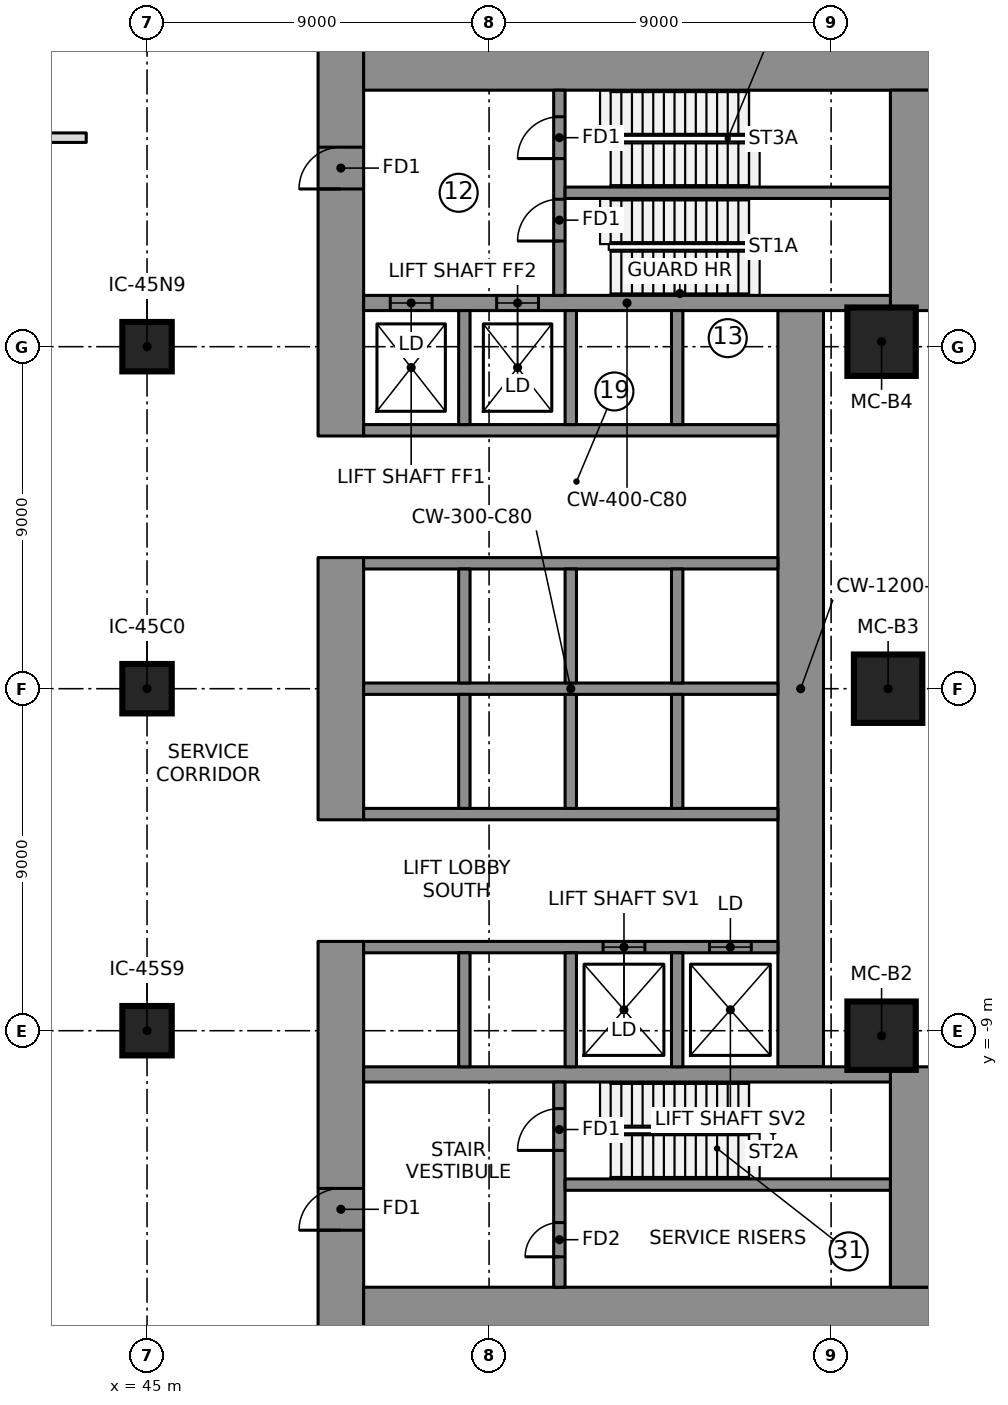
"""IFC4 building model, lengths in metres.
Left out: names, types, materials, properties, quantities, classifications, styles, units other than length and angle.
Written with IfcOpenShell. Run it as: python <this file> out.ifc"""

import sys

from ifc_helpers import new_model, si_unit, direction, frame, frame_2d, origin, origin_2d, place, context, subcontext, project, spatial, rectangle, extrude, element, fill, save


model = new_model("IFC4")
c1 = context("Model", 3, precision=1e-05, world=origin(), true_north=direction((0.0, 1.0)))
c2 = subcontext(c1, "Body", "Model", "MODEL_VIEW")
j1 = project(units=[si_unit("LENGTHUNIT", "METRE"), si_unit("PLANEANGLEUNIT", "RADIAN")], contexts=[c1])
p1 = place(None, origin())
s1 = spatial("IfcSite", under=j1, at=p1, CompositionType="ELEMENT")
p2 = place(p1, origin())
s2 = spatial("IfcBuilding", under=s1, at=p2, CompositionType="ELEMENT")
p3 = place(p2, frame((0.0, 0.0, -10.0)))
s3 = spatial("IfcBuildingStorey", under=s2, at=p3, CompositionType="ELEMENT", Elevation=-10.0)
p4 = place(p3, frame((50.1, 6.65, -0.3), z_axis=(0.0, 0.0, 1.0), x_axis=(0.0, 1.0, 0.0)))
e1 = element("IfcWall", 1, at=p4, inside=s3, PredefinedType="SHEAR", context=c2, shape_type="SweptSolid", body=[
    extrude(rectangle(XDim=10.3, YDim=1.2, at=frame_2d((5.15, 0.0))), origin(), (0.0, 0.0, 1.0), 5.3),
])
p5 = place(p4, frame((6.5, 0.0, 0.3)))
e2 = element("IfcOpeningElement", 2, at=p5, cuts=e1, PredefinedType="OPENING", context=c2, shape_type="SweptSolid", body=[
    extrude(rectangle(XDim=1.1, YDim=2.1, at=frame_2d((0.55, 1.05))), frame((0.0, 0.61, 0.0), z_axis=(0.0, -1.0, 0.0), x_axis=(1.0, 0.0, 0.0)), (0.0, 0.0, 1.0), 1.22),
])
p6 = place(p3, frame((50.1, -3.45, -0.3), z_axis=(0.0, 0.0, 1.0), x_axis=(0.0, 1.0, 0.0)))
e3 = element("IfcWall", 3, at=p6, inside=s3, PredefinedType="SHEAR", context=c2, shape_type="SweptSolid", body=[
    extrude(rectangle(XDim=6.9, YDim=1.2, at=frame_2d((3.45, 0.0))), origin(), (0.0, 0.0, 1.0), 5.3),
])
p7 = place(p3, frame((50.1, -16.95, -0.3), z_axis=(0.0, 0.0, 1.0), x_axis=(0.0, 1.0, 0.0)))
e4 = element("IfcWall", 4, at=p7, inside=s3, PredefinedType="SHEAR", context=c2, shape_type="SweptSolid", body=[
    extrude(rectangle(XDim=10.3, YDim=1.2, at=frame_2d((5.15, 0.0))), origin(), (0.0, 0.0, 1.0), 5.3),
])
p8 = place(p7, frame((2.7, 0.0, 0.3)))
e5 = element("IfcOpeningElement", 5, at=p8, cuts=e4, PredefinedType="OPENING", context=c2, shape_type="SweptSolid", body=[
    extrude(rectangle(XDim=1.1, YDim=2.1, at=frame_2d((0.55, 1.05))), frame((0.0, 0.61, 0.0), z_axis=(0.0, -1.0, 0.0), x_axis=(1.0, 0.0, 0.0)), (0.0, 0.0, 1.0), 1.22),
])
for number, where, z_axis, x_axis in (
    (6, (50.7, 16.35, -0.3), (0.0, 0.0, 1.0), (1.0, 0.0, 0.0)),
    (7, (50.7, -16.35, -0.3), (0.0, 0.0, 1.0), (1.0, 0.0, 0.0)),
):
    element("IfcWall", number, at=place(p3, frame(where, z_axis=z_axis, x_axis=x_axis)), inside=s3, PredefinedType="SHEAR", context=c2, shape_type="SweptSolid", body=[
        extrude(rectangle(XDim=15.06, YDim=1.2, at=frame_2d((7.53, 0.0))), origin(), (0.0, 0.0, 1.0), 5.3),
    ])
for number, where, z_axis, x_axis in (
    (8, (65.16, 9.95, -0.3), (0.0, 0.0, 1.0), (0.0, 1.0, 0.0)),
    (9, (65.16, -15.75, -0.3), (0.0, 0.0, 1.0), (0.0, 1.0, 0.0)),
):
    element("IfcWall", number, at=place(p3, frame(where, z_axis=z_axis, x_axis=x_axis)), inside=s3, PredefinedType="SHEAR", context=c2, shape_type="SweptSolid", body=[
        extrude(rectangle(XDim=5.8, YDim=1.2, at=frame_2d((2.9, 0.0))), origin(), (0.0, 0.0, 1.0), 5.3),
    ])
p9 = place(p3, frame((62.2, -9.95, -0.3), z_axis=(0.0, 0.0, 1.0), x_axis=(0.0, 1.0, 0.0)))
e10 = element("IfcWall", 10, at=p9, inside=s3, PredefinedType="SHEAR", context=c2, shape_type="SweptSolid", body=[
    extrude(rectangle(XDim=19.9, YDim=1.2, at=frame_2d((9.95, 0.0))), origin(), (0.0, 0.0, 1.0), 5.3),
])
p10 = place(p3, frame((50.7, 10.15, -0.3), z_axis=(0.0, 0.0, 1.0), x_axis=(1.0, 0.0, 0.0)))
e11 = element("IfcWall", 11, at=p10, inside=s3, PredefinedType="SHEAR", context=c2, shape_type="SweptSolid", body=[
    extrude(rectangle(XDim=13.86, YDim=0.4, at=frame_2d((6.93, 0.0))), origin(), (0.0, 0.0, 1.0), 5.3),
])
p11 = place(p10, frame((0.7, 0.0, 0.3)))
e12 = element("IfcOpeningElement", 12, at=p11, cuts=e11, PredefinedType="OPENING", context=c2, shape_type="SweptSolid", body=[
    extrude(rectangle(XDim=1.1, YDim=2.1, at=frame_2d((0.55, 1.05))), frame((0.0, 0.21, 0.0), z_axis=(0.0, -1.0, 0.0), x_axis=(1.0, 0.0, 0.0)), (0.0, 0.0, 1.0), 0.42),
])
p12 = place(p10, frame((3.5, 0.0, 0.3)))
e13 = element("IfcOpeningElement", 13, at=p12, cuts=e11, PredefinedType="OPENING", context=c2, shape_type="SweptSolid", body=[
    extrude(rectangle(XDim=1.1, YDim=2.1, at=frame_2d((0.55, 1.05))), frame((0.0, 0.21, 0.0), z_axis=(0.0, -1.0, 0.0), x_axis=(1.0, 0.0, 0.0)), (0.0, 0.0, 1.0), 0.42),
])
p13 = place(p3, frame((50.7, -10.15, -0.3), z_axis=(0.0, 0.0, 1.0), x_axis=(1.0, 0.0, 0.0)))
e14 = element("IfcWall", 14, at=p13, inside=s3, PredefinedType="SHEAR", context=c2, shape_type="SweptSolid", body=[
    extrude(rectangle(XDim=13.86, YDim=0.4, at=frame_2d((6.93, 0.0))), origin(), (0.0, 0.0, 1.0), 5.3),
])
for number, where, z_axis, x_axis in (
    (15, (50.7, 0.0, -0.3), (0.0, 0.0, 1.0), (1.0, 0.0, 0.0)),
    (16, (50.7, 3.3, -0.3), (0.0, 0.0, 1.0), (1.0, 0.0, 0.0)),
    (17, (50.7, 6.8, -0.3), (0.0, 0.0, 1.0), (1.0, 0.0, 0.0)),
):
    element("IfcWall", number, at=place(p3, frame(where, z_axis=z_axis, x_axis=x_axis)), inside=s3, PredefinedType="SHEAR", context=c2, shape_type="SweptSolid", body=[
        extrude(rectangle(XDim=10.9, YDim=0.3, at=frame_2d((5.45, 0.0))), origin(), (0.0, 0.0, 1.0), 5.3),
    ])
for number, where, z_axis, x_axis in (
    (18, (53.35, 0.15, -0.3), (0.0, 0.0, 1.0), (0.0, 1.0, 0.0)),
    (19, (53.35, 6.95, -0.3), (0.0, 0.0, 1.0), (0.0, 1.0, 0.0)),
    (20, (56.15, 0.15, -0.3), (0.0, 0.0, 1.0), (0.0, 1.0, 0.0)),
    (21, (56.15, 6.95, -0.3), (0.0, 0.0, 1.0), (0.0, 1.0, 0.0)),
    (22, (58.95, 0.15, -0.3), (0.0, 0.0, 1.0), (0.0, 1.0, 0.0)),
    (23, (58.95, 6.95, -0.3), (0.0, 0.0, 1.0), (0.0, 1.0, 0.0)),
):
    element("IfcWall", number, at=place(p3, frame(where, z_axis=z_axis, x_axis=x_axis)), inside=s3, PredefinedType="SHEAR", context=c2, shape_type="SweptSolid", body=[
        extrude(rectangle(XDim=3.0, YDim=0.3, at=frame_2d((1.5, 0.0))), origin(), (0.0, 0.0, 1.0), 5.3),
    ])
p14 = place(p3, frame((50.7, -3.3, -0.3), z_axis=(0.0, 0.0, 1.0), x_axis=(1.0, 0.0, 0.0)))
e24 = element("IfcWall", 24, at=p14, inside=s3, PredefinedType="SHEAR", context=c2, shape_type="SweptSolid", body=[
    extrude(rectangle(XDim=10.9, YDim=0.3, at=frame_2d((5.45, 0.0))), origin(), (0.0, 0.0, 1.0), 5.3),
])
p15 = place(p3, frame((50.7, -6.8, -0.3), z_axis=(0.0, 0.0, 1.0), x_axis=(1.0, 0.0, 0.0)))
e25 = element("IfcWall", 25, at=p15, inside=s3, PredefinedType="SHEAR", context=c2, shape_type="SweptSolid", body=[
    extrude(rectangle(XDim=10.9, YDim=0.3, at=frame_2d((5.45, 0.0))), origin(), (0.0, 0.0, 1.0), 5.3),
])
p16 = place(p15, frame((6.3, 0.0, 0.3)))
e26 = element("IfcOpeningElement", 26, at=p16, cuts=e25, PredefinedType="OPENING", context=c2, shape_type="SweptSolid", body=[
    extrude(rectangle(XDim=1.1, YDim=2.1, at=frame_2d((0.55, 1.05))), frame((0.0, 0.16, 0.0), z_axis=(0.0, -1.0, 0.0), x_axis=(1.0, 0.0, 0.0)), (0.0, 0.0, 1.0), 0.32),
])
p17 = place(p15, frame((9.1, 0.0, 0.3)))
e27 = element("IfcOpeningElement", 27, at=p17, cuts=e25, PredefinedType="OPENING", context=c2, shape_type="SweptSolid", body=[
    extrude(rectangle(XDim=1.1, YDim=2.1, at=frame_2d((0.55, 1.05))), frame((0.0, 0.16, 0.0), z_axis=(0.0, -1.0, 0.0), x_axis=(1.0, 0.0, 0.0)), (0.0, 0.0, 1.0), 0.32),
])
for number, where, z_axis, x_axis in (
    (28, (53.35, -3.15, -0.3), (0.0, 0.0, 1.0), (0.0, 1.0, 0.0)),
    (29, (53.35, -9.95, -0.3), (0.0, 0.0, 1.0), (0.0, 1.0, 0.0)),
    (30, (56.15, -3.15, -0.3), (0.0, 0.0, 1.0), (0.0, 1.0, 0.0)),
    (31, (56.15, -9.95, -0.3), (0.0, 0.0, 1.0), (0.0, 1.0, 0.0)),
    (32, (58.95, -3.15, -0.3), (0.0, 0.0, 1.0), (0.0, 1.0, 0.0)),
    (33, (58.95, -9.95, -0.3), (0.0, 0.0, 1.0), (0.0, 1.0, 0.0)),
):
    element("IfcWall", number, at=place(p3, frame(where, z_axis=z_axis, x_axis=x_axis)), inside=s3, PredefinedType="SHEAR", context=c2, shape_type="SweptSolid", body=[
        extrude(rectangle(XDim=3.0, YDim=0.3, at=frame_2d((1.5, 0.0))), origin(), (0.0, 0.0, 1.0), 5.3),
    ])
p18 = place(p3, frame((55.85, 10.35, -0.3), z_axis=(0.0, 0.0, 1.0), x_axis=(0.0, 1.0, 0.0)))
e34 = element("IfcWall", 34, at=p18, inside=s3, PredefinedType="SHEAR", context=c2, shape_type="SweptSolid", body=[
    extrude(rectangle(XDim=5.4, YDim=0.3, at=frame_2d((2.7, 0.0))), origin(), (0.0, 0.0, 1.0), 5.3),
])
p19 = place(p18, frame((1.43, 0.0, 0.3)))
e35 = element("IfcOpeningElement", 35, at=p19, cuts=e34, PredefinedType="OPENING", context=c2, shape_type="SweptSolid", body=[
    extrude(rectangle(XDim=1.1, YDim=2.1, at=frame_2d((0.55, 1.05))), frame((0.0, 0.16, 0.0), z_axis=(0.0, -1.0, 0.0), x_axis=(1.0, 0.0, 0.0)), (0.0, 0.0, 1.0), 0.32),
])
p20 = place(p18, frame((3.6, 0.0, 0.3)))
e36 = element("IfcOpeningElement", 36, at=p20, cuts=e34, PredefinedType="OPENING", context=c2, shape_type="SweptSolid", body=[
    extrude(rectangle(XDim=1.1, YDim=2.1, at=frame_2d((0.55, 1.05))), frame((0.0, 0.16, 0.0), z_axis=(0.0, -1.0, 0.0), x_axis=(1.0, 0.0, 0.0)), (0.0, 0.0, 1.0), 0.32),
])
p21 = place(p3, frame((55.85, -15.75, -0.3), z_axis=(0.0, 0.0, 1.0), x_axis=(0.0, 1.0, 0.0)))
e37 = element("IfcWall", 37, at=p21, inside=s3, PredefinedType="SHEAR", context=c2, shape_type="SweptSolid", body=[
    extrude(rectangle(XDim=5.4, YDim=0.3, at=frame_2d((2.7, 0.0))), origin(), (0.0, 0.0, 1.0), 5.3),
])
p22 = place(p21, frame((3.6, 0.0, 0.3)))
e38 = element("IfcOpeningElement", 38, at=p22, cuts=e37, PredefinedType="OPENING", context=c2, shape_type="SweptSolid", body=[
    extrude(rectangle(XDim=1.1, YDim=2.1, at=frame_2d((0.55, 1.05))), frame((0.0, 0.16, 0.0), z_axis=(0.0, -1.0, 0.0), x_axis=(1.0, 0.0, 0.0)), (0.0, 0.0, 1.0), 0.32),
])
p23 = place(p21, frame((0.8, 0.0, 0.3)))
e39 = element("IfcOpeningElement", 39, at=p23, cuts=e37, PredefinedType="OPENING", context=c2, shape_type="SweptSolid", body=[
    extrude(rectangle(XDim=0.9, YDim=2.1, at=frame_2d((0.45, 1.05))), frame((0.0, 0.16, 0.0), z_axis=(0.0, -1.0, 0.0), x_axis=(1.0, 0.0, 0.0)), (0.0, 0.0, 1.0), 0.32),
])
for number, where, z_axis, x_axis in (
    (40, (56.0, 13.05, -0.3), (0.0, 0.0, 1.0), (1.0, 0.0, 0.0)),
    (41, (56.0, -13.05, -0.3), (0.0, 0.0, 1.0), (1.0, 0.0, 0.0)),
):
    element("IfcWall", number, at=place(p3, frame(where, z_axis=z_axis, x_axis=x_axis)), inside=s3, PredefinedType="SHEAR", context=c2, shape_type="SweptSolid", body=[
        extrude(rectangle(XDim=8.56, YDim=0.3, at=frame_2d((4.28, 0.0))), origin(), (0.0, 0.0, 1.0), 5.3),
    ])
for number, where, z_axis, x_axis in (
    (42, (64.328, -9.131, -0.3), (0.0, 0.0, 1.0), (1.0, 0.0, 0.0)),
    (43, (64.5, 0.0, -0.3), (0.0, 0.0, 1.0), (1.0, 0.0, 0.0)),
    (44, (64.328, 9.131, -0.3), (0.0, 0.0, 1.0), (1.0, 0.0, 0.0)),
):
    element("IfcColumn", number, at=place(p3, frame(where, z_axis=z_axis, x_axis=x_axis)), inside=s3, PredefinedType="COLUMN", context=c2, shape_type="SweptSolid", body=[
        extrude(rectangle(XDim=1.8, YDim=1.8, at=origin_2d()), origin(), (0.0, 0.0, 1.0), 5.3),
    ])
for number, where, z_axis, x_axis in (
    (45, (45.0, -9.0, -0.3), (0.0, 0.0, 1.0), (1.0, 0.0, 0.0)),
    (46, (45.0, 0.0, -0.3), (0.0, 0.0, 1.0), (1.0, 0.0, 0.0)),
    (47, (45.0, 9.0, -0.3), (0.0, 0.0, 1.0), (1.0, 0.0, 0.0)),
):
    element("IfcColumn", number, at=place(p3, frame(where, z_axis=z_axis, x_axis=x_axis)), inside=s3, PredefinedType="COLUMN", context=c2, shape_type="SweptSolid", body=[
        extrude(rectangle(XDim=1.3, YDim=1.3, at=origin_2d()), origin(), (0.0, 0.0, 1.0), 5.3),
    ])
p24 = place(p3, frame((39.125, 14.5, 0.0), z_axis=(0.0, 0.0, 1.0), x_axis=(1.0, 0.0, 0.0)))
e48 = element("IfcWall", 48, at=p24, inside=s3, PredefinedType="PARTITIONING", context=c2, shape_type="SweptSolid", body=[
    extrude(rectangle(XDim=4.275, YDim=0.25, at=frame_2d((2.137, 0.0))), origin(), (0.0, 0.0, 1.0), 4.7),
])
p25 = place(p11, origin())
e49 = element("IfcDoor", 49, at=p25, inside=s3, OperationType="DOUBLE_DOOR_SLIDING", PredefinedType="DOOR", context=c2, shape_type="SweptSolid", body=[
    extrude(rectangle(XDim=1.1, YDim=2.1, at=frame_2d((0.55, 1.05))), frame((0.0, 0.025, 0.0), z_axis=(0.0, -1.0, 0.0), x_axis=(1.0, 0.0, 0.0)), (0.0, 0.0, 1.0), 0.05),
])
fill(e12, e49)
p26 = place(p12, origin())
e50 = element("IfcDoor", 50, at=p26, inside=s3, OperationType="DOUBLE_DOOR_SLIDING", PredefinedType="DOOR", context=c2, shape_type="SweptSolid", body=[
    extrude(rectangle(XDim=1.1, YDim=2.1, at=frame_2d((0.55, 1.05))), frame((0.0, 0.025, 0.0), z_axis=(0.0, -1.0, 0.0), x_axis=(1.0, 0.0, 0.0)), (0.0, 0.0, 1.0), 0.05),
])
fill(e13, e50)
p27 = place(p16, origin())
e51 = element("IfcDoor", 51, at=p27, inside=s3, OperationType="DOUBLE_DOOR_SLIDING", PredefinedType="DOOR", context=c2, shape_type="SweptSolid", body=[
    extrude(rectangle(XDim=1.1, YDim=2.1, at=frame_2d((0.55, 1.05))), frame((0.0, 0.025, 0.0), z_axis=(0.0, -1.0, 0.0), x_axis=(1.0, 0.0, 0.0)), (0.0, 0.0, 1.0), 0.05),
])
fill(e26, e51)
p28 = place(p17, origin())
e52 = element("IfcDoor", 52, at=p28, inside=s3, OperationType="DOUBLE_DOOR_SLIDING", PredefinedType="DOOR", context=c2, shape_type="SweptSolid", body=[
    extrude(rectangle(XDim=1.1, YDim=2.1, at=frame_2d((0.55, 1.05))), frame((0.0, 0.025, 0.0), z_axis=(0.0, -1.0, 0.0), x_axis=(1.0, 0.0, 0.0)), (0.0, 0.0, 1.0), 0.05),
])
fill(e27, e52)
p29 = place(p19, origin())
e53 = element("IfcDoor", 53, at=p29, inside=s3, OperationType="SINGLE_SWING_RIGHT", PredefinedType="DOOR", context=c2, shape_type="SweptSolid", body=[
    extrude(rectangle(XDim=1.1, YDim=2.1, at=frame_2d((0.55, 1.05))), frame((0.0, 0.025, 0.0), z_axis=(0.0, -1.0, 0.0), x_axis=(1.0, 0.0, 0.0)), (0.0, 0.0, 1.0), 0.05),
])
fill(e35, e53)
p30 = place(p20, origin())
e54 = element("IfcDoor", 54, at=p30, inside=s3, OperationType="SINGLE_SWING_RIGHT", PredefinedType="DOOR", context=c2, shape_type="SweptSolid", body=[
    extrude(rectangle(XDim=1.1, YDim=2.1, at=frame_2d((0.55, 1.05))), frame((0.0, 0.025, 0.0), z_axis=(0.0, -1.0, 0.0), x_axis=(1.0, 0.0, 0.0)), (0.0, 0.0, 1.0), 0.05),
])
fill(e36, e54)
p31 = place(p22, origin())
e55 = element("IfcDoor", 55, at=p31, inside=s3, OperationType="SINGLE_SWING_RIGHT", PredefinedType="DOOR", context=c2, shape_type="SweptSolid", body=[
    extrude(rectangle(XDim=1.1, YDim=2.1, at=frame_2d((0.55, 1.05))), frame((0.0, 0.025, 0.0), z_axis=(0.0, -1.0, 0.0), x_axis=(1.0, 0.0, 0.0)), (0.0, 0.0, 1.0), 0.05),
])
fill(e38, e55)
p32 = place(p5, origin())
e56 = element("IfcDoor", 56, at=p32, inside=s3, OperationType="SINGLE_SWING_RIGHT", PredefinedType="DOOR", context=c2, shape_type="SweptSolid", body=[
    extrude(rectangle(XDim=1.1, YDim=2.1, at=frame_2d((0.55, 1.05))), frame((0.0, 0.025, 0.0), z_axis=(0.0, -1.0, 0.0), x_axis=(1.0, 0.0, 0.0)), (0.0, 0.0, 1.0), 0.05),
])
fill(e2, e56)
p33 = place(p8, origin())
e57 = element("IfcDoor", 57, at=p33, inside=s3, OperationType="SINGLE_SWING_RIGHT", PredefinedType="DOOR", context=c2, shape_type="SweptSolid", body=[
    extrude(rectangle(XDim=1.1, YDim=2.1, at=frame_2d((0.55, 1.05))), frame((0.0, 0.025, 0.0), z_axis=(0.0, -1.0, 0.0), x_axis=(1.0, 0.0, 0.0)), (0.0, 0.0, 1.0), 0.05),
])
fill(e5, e57)
p34 = place(p23, origin())
e58 = element("IfcDoor", 58, at=p34, inside=s3, OperationType="SINGLE_SWING_LEFT", PredefinedType="DOOR", context=c2, shape_type="SweptSolid", body=[
    extrude(rectangle(XDim=0.9, YDim=2.1, at=frame_2d((0.45, 1.05))), frame((0.0, 0.025, 0.0), z_axis=(0.0, -1.0, 0.0), x_axis=(1.0, 0.0, 0.0)), (0.0, 0.0, 1.0), 0.05),
])
fill(e39, e58)
save(model, sys.argv[1])
